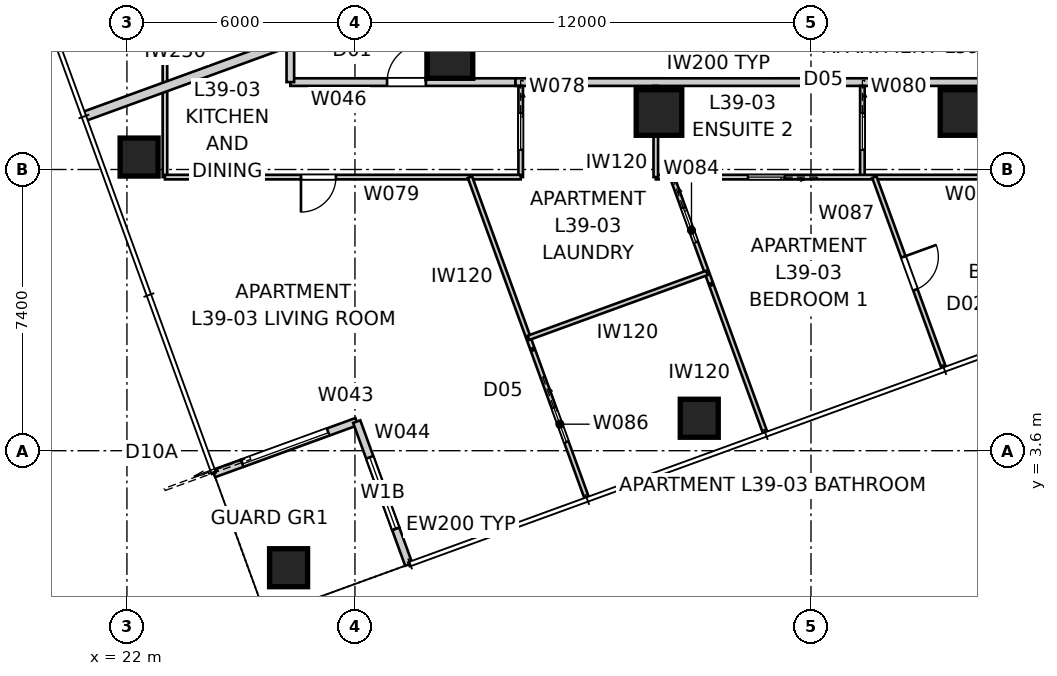
"""IFC4 building model, lengths in metres.
Left out: names, types, materials, properties, quantities, classifications, styles, units other than length and angle.
Written with IfcOpenShell. Run it as: python <this file> out.ifc"""

import sys

from ifc_helpers import new_model, si_unit, direction, frame, frame_2d, origin, origin_2d, place, context, subcontext, project, spatial, rectangle, extrude, element, fill, save


model = new_model("IFC4")
c1 = context("Model", 3, precision=1e-05, world=origin(), true_north=direction((0.0, 1.0)))
c2 = subcontext(c1, "Body", "Model", "MODEL_VIEW")
j1 = project(units=[si_unit("LENGTHUNIT", "METRE"), si_unit("PLANEANGLEUNIT", "RADIAN")], contexts=[c1])
p1 = place(None, origin())
s1 = spatial("IfcSite", under=j1, at=p1, CompositionType="ELEMENT")
p2 = place(p1, origin())
s2 = spatial("IfcBuilding", under=s1, at=p2, CompositionType="ELEMENT")
p3 = place(p2, frame((0.0, 0.0, 143.8)))
s3 = spatial("IfcBuildingStorey", under=s2, at=p3, CompositionType="ELEMENT", Elevation=143.8)
for number, where, z_axis, x_axis in (
    (1, (26.253, 0.521, -0.15), (0.0, 0.0, 1.0), (1.0, 0.0, 0.0)),
    (2, (37.06, 4.454, -0.15), (0.0, 0.0, 1.0), (1.0, 0.0, 0.0)),
    (3, (22.32, 11.327, -0.15), (0.0, 0.0, 1.0), (1.0, 0.0, 0.0)),
):
    element("IfcColumn", number, at=place(p3, frame(where, z_axis=z_axis, x_axis=x_axis)), inside=s3, PredefinedType="COLUMN", context=c2, shape_type="SweptSolid", body=[
        extrude(rectangle(XDim=1.0, YDim=1.0, at=origin_2d()), origin(), (0.0, 0.0, 1.0), 3.55),
    ])
for number, where, z_axis, x_axis in (
    (4, (30.5, 14.0, 0.0), (0.0, 0.0, 1.0), (1.0, 0.0, 0.0)),
    (5, (36.0, 12.5, 0.0), (0.0, 0.0, 1.0), (1.0, 0.0, 0.0)),
    (6, (44.0, 12.5, 0.0), (0.0, 0.0, 1.0), (1.0, 0.0, 0.0)),
):
    element("IfcColumn", number, at=place(p3, frame(where, z_axis=z_axis, x_axis=x_axis)), inside=s3, PredefinedType="COLUMN", context=c2, shape_type="SweptSolid", body=[
        extrude(rectangle(XDim=1.2, YDim=1.2, at=origin_2d()), origin(), (0.0, 0.0, 1.0), 3.4),
    ])
p4 = place(p3, frame((24.288, 2.998, 0.0), z_axis=(0.0, 0.0, 1.0), x_axis=(0.939659694648, 0.342110593602, 0.0)))
e7 = element("IfcWall", 7, at=p4, inside=s3, PredefinedType="SOLIDWALL", context=c2, shape_type="SweptSolid", body=[
    extrude(rectangle(XDim=0.8, YDim=0.2, at=frame_2d((0.4, 0.0))), origin(), (0.0, 0.0, 1.0), 3.25),
])
p5 = place(p3, frame((25.04, 3.271, 0.0), z_axis=(0.0, 0.0, 1.0), x_axis=(0.939693144909, 0.342018703306, 0.0)))
e8 = element("IfcWall", 8, at=p5, inside=s3, PredefinedType="SOLIDWALL", context=c2, shape_type="SweptSolid", body=[
    extrude(rectangle(XDim=3.2, YDim=0.2, at=frame_2d((1.6, 0.0))), origin(), (0.0, 0.0, 1.0), 2.722),
])
p6 = place(p5, origin())
e9 = element("IfcOpeningElement", 9, at=p6, cuts=e8, PredefinedType="OPENING", context=c2, shape_type="SweptSolid", body=[
    extrude(rectangle(XDim=2.4, YDim=2.1, at=frame_2d((1.2, 1.05))), frame((0.0, 0.11, 0.0), z_axis=(0.0, -1.0, 0.0), x_axis=(1.0, 0.0, 0.0)), (0.0, 0.0, 1.0), 0.22),
])
p7 = place(p3, frame((28.047, 4.366, 0.0), z_axis=(0.0, 0.0, 1.0), x_axis=(0.341965219194, -0.939712609717, 0.0)))
e10 = element("IfcWall", 10, at=p7, inside=s3, PredefinedType="SOLIDWALL", context=c2, shape_type="SweptSolid", body=[
    extrude(rectangle(XDim=3.0, YDim=0.2, at=frame_2d((1.5, 0.0))), origin(), (0.0, 0.0, 1.0), 2.722),
])
p8 = place(p7, frame((1.0, 0.0, 0.45)))
e11 = element("IfcOpeningElement", 11, at=p8, cuts=e10, PredefinedType="OPENING", context=c2, shape_type="SweptSolid", body=[
    extrude(rectangle(XDim=2.0, YDim=1.8, at=frame_2d((1.0, 0.9))), frame((0.0, 0.11, 0.0), z_axis=(0.0, -1.0, 0.0), x_axis=(1.0, 0.0, 0.0)), (0.0, 0.0, 1.0), 0.22),
])
p9 = place(p3, frame((29.073, 1.547, 0.0), z_axis=(0.0, 0.0, 1.0), x_axis=(0.342037080957, -0.939686455819, 0.0)))
e12 = element("IfcWall", 12, at=p9, inside=s3, PredefinedType="SOLIDWALL", context=c2, shape_type="SweptSolid", body=[
    extrude(rectangle(XDim=1.0, YDim=0.2, at=frame_2d((0.5, 0.0))), origin(), (0.0, 0.0, 1.0), 3.25),
])
p10 = place(p3, frame((26.3, 13.3, 0.0), z_axis=(0.0, 0.0, 1.0), x_axis=(1.0, 0.0, 0.0)))
e13 = element("IfcWall", 13, at=p10, inside=s3, PredefinedType="PARTITIONING", context=c2, shape_type="SweptSolid", body=[
    extrude(rectangle(XDim=5.925, YDim=0.2, at=frame_2d((2.962, 0.0))), origin(), (0.0, 0.0, 1.0), 3.25),
])
p11 = place(p10, frame((2.545, 0.0, 0.0)))
e14 = element("IfcOpeningElement", 14, at=p11, cuts=e13, PredefinedType="OPENING", context=c2, shape_type="SweptSolid", body=[
    extrude(rectangle(XDim=1.02, YDim=2.34, at=frame_2d((0.51, 1.17))), frame((0.0, 0.11, 0.0), z_axis=(0.0, -1.0, 0.0), x_axis=(1.0, 0.0, 0.0)), (0.0, 0.0, 1.0), 0.22),
])
p12 = place(p3, frame((32.225, 13.3, 0.0), z_axis=(0.0, 0.0, 1.0), x_axis=(1.0, 0.0, 0.0)))
e15 = element("IfcWall", 15, at=p12, inside=s3, PredefinedType="PARTITIONING", context=c2, shape_type="SweptSolid", body=[
    extrude(rectangle(XDim=1.684, YDim=0.2, at=frame_2d((0.842, 0.0))), origin(), (0.0, 0.0, 1.0), 2.55),
])
p13 = place(p3, frame((33.908, 13.3, 0.0), z_axis=(0.0, 0.0, 1.0), x_axis=(1.0, 0.0, 0.0)))
e16 = element("IfcWall", 16, at=p13, inside=s3, PredefinedType="PARTITIONING", context=c2, shape_type="SweptSolid", body=[
    extrude(rectangle(XDim=12.183, YDim=0.2, at=frame_2d((6.092, 0.0))), origin(), (0.0, 0.0, 1.0), 3.25),
])
p14 = place(p3, frame((26.3, 46.3, 0.0), z_axis=(0.0, 0.0, 1.0), x_axis=(0.0, -1.0, 0.0)))
e17 = element("IfcWall", 17, at=p14, inside=s3, PredefinedType="PARTITIONING", context=c2, shape_type="SweptSolid", body=[
    extrude(rectangle(XDim=33.0, YDim=0.2, at=frame_2d((16.5, 0.0))), origin(), (0.0, 0.0, 1.0), 3.25),
])
p15 = place(p14, frame((13.229, 0.0, 0.0)))
e18 = element("IfcOpeningElement", 18, at=p15, cuts=e17, PredefinedType="OPENING", context=c2, shape_type="SweptSolid", body=[
    extrude(rectangle(XDim=1.02, YDim=2.34, at=frame_2d((0.51, 1.17))), frame((0.0, 0.11, 0.0), z_axis=(0.0, -1.0, 0.0), x_axis=(1.0, 0.0, 0.0)), (0.0, 0.0, 1.0), 0.22),
])
p16 = place(p14, frame((28.51, 0.0, 0.0)))
e19 = element("IfcOpeningElement", 19, at=p16, cuts=e17, PredefinedType="OPENING", context=c2, shape_type="SweptSolid", body=[
    extrude(rectangle(XDim=1.02, YDim=2.34, at=frame_2d((0.51, 1.17))), frame((0.0, 0.11, 0.0), z_axis=(0.0, -1.0, 0.0), x_axis=(1.0, 0.0, 0.0)), (0.0, 0.0, 1.0), 0.22),
])
p17 = place(p14, frame((1.998, 0.0, 0.0)))
e20 = element("IfcOpeningElement", 20, at=p17, cuts=e17, PredefinedType="OPENING", context=c2, shape_type="SweptSolid", body=[
    extrude(rectangle(XDim=1.02, YDim=2.34, at=frame_2d((0.51, 1.17))), frame((0.0, 0.11, 0.0), z_axis=(0.0, -1.0, 0.0), x_axis=(1.0, 0.0, 0.0)), (0.0, 0.0, 1.0), 0.22),
])
p18 = place(p3, frame((20.868, 12.395, 0.0), z_axis=(0.0, 0.0, 1.0), x_axis=(0.939690274876, 0.342026588591, 0.0)))
e21 = element("IfcWall", 21, at=p18, inside=s3, PredefinedType="PARTITIONING", context=c2, shape_type="SweptSolid", body=[
    extrude(rectangle(XDim=5.669, YDim=0.25, at=frame_2d((2.834, 0.0))), origin(), (0.0, 0.0, 1.0), 3.25),
])
p19 = place(p3, frame((23.0, 10.8, 0.0), z_axis=(0.0, 0.0, 1.0), x_axis=(0.0, 1.0, 0.0)))
e22 = element("IfcWall", 22, at=p19, inside=s3, PredefinedType="PARTITIONING", context=c2, shape_type="SweptSolid", body=[
    extrude(rectangle(XDim=38.0, YDim=0.12, at=frame_2d((19.0, 0.0))), origin(), (0.0, 0.0, 1.0), 2.55),
])
p20 = place(p19, frame((20.674, 0.0, 0.0)))
e23 = element("IfcOpeningElement", 23, at=p20, cuts=e22, PredefinedType="OPENING", context=c2, shape_type="SweptSolid", body=[
    extrude(rectangle(XDim=0.92, YDim=2.34, at=frame_2d((0.46, 1.17))), frame((0.0, 0.07, 0.0), z_axis=(0.0, -1.0, 0.0), x_axis=(1.0, 0.0, 0.0)), (0.0, 0.0, 1.0), 0.14),
])
p21 = place(p19, frame((4.598, 0.0, 0.0)))
e24 = element("IfcOpeningElement", 24, at=p21, cuts=e22, PredefinedType="OPENING", context=c2, shape_type="SweptSolid", body=[
    extrude(rectangle(XDim=0.92, YDim=2.34, at=frame_2d((0.46, 1.17))), frame((0.0, 0.07, 0.0), z_axis=(0.0, -1.0, 0.0), x_axis=(1.0, 0.0, 0.0)), (0.0, 0.0, 1.0), 0.14),
])
p22 = place(p19, frame((8.043, 0.0, 0.0)))
e25 = element("IfcOpeningElement", 25, at=p22, cuts=e22, PredefinedType="OPENING", context=c2, shape_type="SweptSolid", body=[
    extrude(rectangle(XDim=0.92, YDim=2.34, at=frame_2d((0.46, 1.17))), frame((0.0, 0.07, 0.0), z_axis=(0.0, -1.0, 0.0), x_axis=(1.0, 0.0, 0.0)), (0.0, 0.0, 1.0), 0.14),
])
p23 = place(p19, frame((33.957, 0.0, 0.0)))
e26 = element("IfcOpeningElement", 26, at=p23, cuts=e22, PredefinedType="OPENING", context=c2, shape_type="SweptSolid", body=[
    extrude(rectangle(XDim=0.92, YDim=2.34, at=frame_2d((0.46, 1.17))), frame((0.0, 0.07, 0.0), z_axis=(0.0, -1.0, 0.0), x_axis=(1.0, 0.0, 0.0)), (0.0, 0.0, 1.0), 0.14),
])
p24 = place(p19, frame((26.957, 0.0, 0.0)))
e27 = element("IfcOpeningElement", 27, at=p24, cuts=e22, PredefinedType="OPENING", context=c2, shape_type="SweptSolid", body=[
    extrude(rectangle(XDim=0.96, YDim=2.1, at=frame_2d((0.48, 1.05))), frame((0.0, 0.07, 0.0), z_axis=(0.0, -1.0, 0.0), x_axis=(1.0, 0.0, 0.0)), (0.0, 0.0, 1.0), 0.14),
])
p25 = place(p3, frame((32.361, 13.2, 0.0), z_axis=(0.0, 0.0, 1.0), x_axis=(0.0, -1.0, 0.0)))
e28 = element("IfcWall", 28, at=p25, inside=s3, PredefinedType="PARTITIONING", context=c2, shape_type="SweptSolid", body=[
    extrude(rectangle(XDim=2.4, YDim=0.12, at=frame_2d((1.2, 0.0))), origin(), (0.0, 0.0, 1.0), 3.25),
])
p26 = place(p25, frame((0.72, 0.0, 0.0)))
e29 = element("IfcOpeningElement", 29, at=p26, cuts=e28, PredefinedType="OPENING", context=c2, shape_type="SweptSolid", body=[
    extrude(rectangle(XDim=0.96, YDim=2.1, at=frame_2d((0.48, 1.05))), frame((0.0, 0.07, 0.0), z_axis=(0.0, -1.0, 0.0), x_axis=(1.0, 0.0, 0.0)), (0.0, 0.0, 1.0), 0.14),
])
p27 = place(p3, frame((32.361, 10.8, 0.0), z_axis=(0.0, 0.0, 1.0), x_axis=(-1.0, 0.0, 0.0)))
e30 = element("IfcWall", 30, at=p27, inside=s3, PredefinedType="PARTITIONING", context=c2, shape_type="SweptSolid", body=[
    extrude(rectangle(XDim=9.361, YDim=0.12, at=frame_2d((4.681, 0.0))), origin(), (0.0, 0.0, 1.0), 3.25),
])
p28 = place(p27, frame((4.862, 0.0, 0.0)))
e31 = element("IfcOpeningElement", 31, at=p28, cuts=e30, PredefinedType="OPENING", context=c2, shape_type="SweptSolid", body=[
    extrude(rectangle(XDim=0.92, YDim=2.34, at=frame_2d((0.46, 1.17))), frame((0.0, 0.07, 0.0), z_axis=(0.0, -1.0, 0.0), x_axis=(1.0, 0.0, 0.0)), (0.0, 0.0, 1.0), 0.14),
])
p29 = place(p3, frame((41.353, 13.2, 0.0), z_axis=(0.0, 0.0, 1.0), x_axis=(0.0, -1.0, 0.0)))
e32 = element("IfcWall", 32, at=p29, inside=s3, PredefinedType="PARTITIONING", context=c2, shape_type="SweptSolid", body=[
    extrude(rectangle(XDim=2.4, YDim=0.12, at=frame_2d((1.2, 0.0))), origin(), (0.0, 0.0, 1.0), 3.25),
])
p30 = place(p29, frame((0.72, 0.0, 0.0)))
e33 = element("IfcOpeningElement", 33, at=p30, cuts=e32, PredefinedType="OPENING", context=c2, shape_type="SweptSolid", body=[
    extrude(rectangle(XDim=0.96, YDim=2.1, at=frame_2d((0.48, 1.05))), frame((0.0, 0.07, 0.0), z_axis=(0.0, -1.0, 0.0), x_axis=(1.0, 0.0, 0.0)), (0.0, 0.0, 1.0), 0.14),
])
p31 = place(p3, frame((53.8, 10.8, 0.0), z_axis=(0.0, 0.0, 1.0), x_axis=(-1.0, 0.0, 0.0)))
e34 = element("IfcWall", 34, at=p31, inside=s3, PredefinedType="PARTITIONING", context=c2, shape_type="SweptSolid", body=[
    extrude(rectangle(XDim=17.884, YDim=0.12, at=frame_2d((8.942, 0.0))), origin(), (0.0, 0.0, 1.0), 3.25),
])
p32 = place(p31, frame((3.665, 0.0, 0.0)))
e35 = element("IfcOpeningElement", 35, at=p32, cuts=e34, PredefinedType="OPENING", context=c2, shape_type="SweptSolid", body=[
    extrude(rectangle(XDim=0.92, YDim=2.34, at=frame_2d((0.46, 1.17))), frame((0.0, 0.07, 0.0), z_axis=(0.0, -1.0, 0.0), x_axis=(1.0, 0.0, 0.0)), (0.0, 0.0, 1.0), 0.14),
])
p33 = place(p31, frame((14.497, 0.0, 0.0)))
e36 = element("IfcOpeningElement", 36, at=p33, cuts=e34, PredefinedType="OPENING", context=c2, shape_type="SweptSolid", body=[
    extrude(rectangle(XDim=0.96, YDim=2.1, at=frame_2d((0.48, 1.05))), frame((0.0, 0.07, 0.0), z_axis=(0.0, -1.0, 0.0), x_axis=(1.0, 0.0, 0.0)), (0.0, 0.0, 1.0), 0.14),
])
p34 = place(p3, frame((35.916, 10.8, 0.0), z_axis=(0.0, 0.0, 1.0), x_axis=(0.0, 1.0, 0.0)))
e37 = element("IfcWall", 37, at=p34, inside=s3, PredefinedType="PARTITIONING", context=c2, shape_type="SweptSolid", body=[
    extrude(rectangle(XDim=2.4, YDim=0.12, at=frame_2d((1.2, 0.0))), origin(), (0.0, 0.0, 1.0), 3.25),
])
p35 = place(p3, frame((32.666, 6.292, 0.0), z_axis=(0.0, 0.0, 1.0), x_axis=(-0.341988220281, 0.93970423921, 0.0)))
e38 = element("IfcWall", 38, at=p35, inside=s3, PredefinedType="PARTITIONING", context=c2, shape_type="SweptSolid", body=[
    extrude(rectangle(XDim=4.797, YDim=0.12, at=frame_2d((2.399, 0.0))), origin(), (0.0, 0.0, 1.0), 3.25),
])
p36 = place(p3, frame((36.346, 10.8, 0.0), z_axis=(0.0, 0.0, 1.0), x_axis=(0.341986632257, -0.939704817141, 0.0)))
e39 = element("IfcWall", 39, at=p36, inside=s3, PredefinedType="PARTITIONING", context=c2, shape_type="SweptSolid", body=[
    extrude(rectangle(XDim=2.978, YDim=0.12, at=frame_2d((1.489, 0.0))), origin(), (0.0, 0.0, 1.0), 3.25),
])
p37 = place(p36, frame((0.861, 0.0, 0.0)))
e40 = element("IfcOpeningElement", 40, at=p37, cuts=e39, PredefinedType="OPENING", context=c2, shape_type="SweptSolid", body=[
    extrude(rectangle(XDim=0.96, YDim=2.1, at=frame_2d((0.48, 1.05))), frame((0.0, 0.07, 0.0), z_axis=(0.0, -1.0, 0.0), x_axis=(1.0, 0.0, 0.0)), (0.0, 0.0, 1.0), 0.14),
])
p38 = place(p3, frame((37.264, 8.28, 0.0), z_axis=(0.0, 0.0, 1.0), x_axis=(-0.939686455819, -0.342037080957, 0.0)))
e41 = element("IfcWall", 41, at=p38, inside=s3, PredefinedType="PARTITIONING", context=c2, shape_type="SweptSolid", body=[
    extrude(rectangle(XDim=5.0, YDim=0.12, at=frame_2d((2.5, 0.0))), origin(), (0.0, 0.0, 1.0), 3.25),
])
p39 = place(p3, frame((32.685, 6.241, 0.0), z_axis=(0.0, 0.0, 1.0), x_axis=(0.342036918442, -0.939686514973, 0.0)))
e42 = element("IfcWall", 42, at=p39, inside=s3, PredefinedType="PARTITIONING", context=c2, shape_type="SweptSolid", body=[
    extrude(rectangle(XDim=4.136, YDim=0.12, at=frame_2d((2.068, 0.0))), origin(), (0.0, 0.0, 1.0), 3.25),
])
p40 = place(p39, frame((1.608, 0.0, 0.0)))
e43 = element("IfcOpeningElement", 43, at=p40, cuts=e42, PredefinedType="OPENING", context=c2, shape_type="SweptSolid", body=[
    extrude(rectangle(XDim=0.96, YDim=2.1, at=frame_2d((0.48, 1.05))), frame((0.0, 0.07, 0.0), z_axis=(0.0, -1.0, 0.0), x_axis=(1.0, 0.0, 0.0)), (0.0, 0.0, 1.0), 0.14),
])
p41 = place(p3, frame((41.667, 10.8, 0.0), z_axis=(0.0, 0.0, 1.0), x_axis=(0.341995981916, -0.939701414468, 0.0)))
e44 = element("IfcWall", 44, at=p41, inside=s3, PredefinedType="PARTITIONING", context=c2, shape_type="SweptSolid", body=[
    extrude(rectangle(XDim=5.348, YDim=0.12, at=frame_2d((2.674, 0.0))), origin(), (0.0, 0.0, 1.0), 3.25),
])
p42 = place(p41, frame((2.234, 0.0, 0.0)))
e45 = element("IfcOpeningElement", 45, at=p42, cuts=e44, PredefinedType="OPENING", context=c2, shape_type="SweptSolid", body=[
    extrude(rectangle(XDim=0.92, YDim=2.34, at=frame_2d((0.46, 1.17))), frame((0.0, 0.07, 0.0), z_axis=(0.0, -1.0, 0.0), x_axis=(1.0, 0.0, 0.0)), (0.0, 0.0, 1.0), 0.14),
])
p43 = place(p3, frame((38.798, 4.065, 0.0), z_axis=(0.0, 0.0, 1.0), x_axis=(-0.342036918442, 0.939686514973, 0.0)))
e46 = element("IfcWall", 46, at=p43, inside=s3, PredefinedType="PARTITIONING", context=c2, shape_type="SweptSolid", body=[
    extrude(rectangle(XDim=4.136, YDim=0.12, at=frame_2d((2.068, 0.0))), origin(), (0.0, 0.0, 1.0), 3.25),
])
p44 = place(p6, origin())
e47 = element("IfcDoor", 47, at=p44, inside=s3, OperationType="SLIDING_TO_LEFT", PredefinedType="DOOR", context=c2, shape_type="SweptSolid", body=[
    extrude(rectangle(XDim=2.4, YDim=2.1, at=frame_2d((1.2, 1.05))), frame((0.0, 0.025, 0.0), z_axis=(0.0, -1.0, 0.0), x_axis=(1.0, 0.0, 0.0)), (0.0, 0.0, 1.0), 0.05),
])
fill(e9, e47)
p45 = place(p8, origin())
e48 = element("IfcWindow", 48, at=p45, inside=s3, PartitioningType="SINGLE_PANEL", PredefinedType="WINDOW", context=c2, shape_type="SweptSolid", body=[
    extrude(rectangle(XDim=2.0, YDim=1.8, at=frame_2d((1.0, 0.9))), frame((0.0, 0.03, 0.0), z_axis=(0.0, -1.0, 0.0), x_axis=(1.0, 0.0, 0.0)), (0.0, 0.0, 1.0), 0.06),
])
fill(e11, e48)
p46 = place(p11, origin())
e49 = element("IfcDoor", 49, at=p46, inside=s3, OperationType="SINGLE_SWING_RIGHT", PredefinedType="DOOR", context=c2, shape_type="SweptSolid", body=[
    extrude(rectangle(XDim=1.02, YDim=2.34, at=frame_2d((0.51, 1.17))), frame((0.0, 0.025, 0.0), z_axis=(0.0, -1.0, 0.0), x_axis=(1.0, 0.0, 0.0)), (0.0, 0.0, 1.0), 0.05),
])
fill(e14, e49)
p47 = place(p28, origin())
e50 = element("IfcDoor", 50, at=p47, inside=s3, OperationType="SINGLE_SWING_RIGHT", PredefinedType="DOOR", context=c2, shape_type="SweptSolid", body=[
    extrude(rectangle(XDim=0.92, YDim=2.34, at=frame_2d((0.46, 1.17))), frame((0.0, 0.025, 0.0), z_axis=(0.0, -1.0, 0.0), x_axis=(1.0, 0.0, 0.0)), (0.0, 0.0, 1.0), 0.05),
])
fill(e31, e50)
p48 = place(p26, origin())
e51 = element("IfcDoor", 51, at=p48, inside=s3, OperationType="SLIDING_TO_LEFT", PredefinedType="DOOR", context=c2, shape_type="SweptSolid", body=[
    extrude(rectangle(XDim=0.96, YDim=2.1, at=frame_2d((0.48, 1.05))), frame((0.0, 0.025, 0.0), z_axis=(0.0, -1.0, 0.0), x_axis=(1.0, 0.0, 0.0)), (0.0, 0.0, 1.0), 0.05),
])
fill(e29, e51)
p49 = place(p40, origin())
e52 = element("IfcDoor", 52, at=p49, inside=s3, OperationType="SLIDING_TO_LEFT", PredefinedType="DOOR", context=c2, shape_type="SweptSolid", body=[
    extrude(rectangle(XDim=0.96, YDim=2.1, at=frame_2d((0.48, 1.05))), frame((0.0, 0.025, 0.0), z_axis=(0.0, -1.0, 0.0), x_axis=(1.0, 0.0, 0.0)), (0.0, 0.0, 1.0), 0.05),
])
fill(e43, e52)
p50 = place(p37, origin())
e53 = element("IfcDoor", 53, at=p50, inside=s3, OperationType="SLIDING_TO_LEFT", PredefinedType="DOOR", context=c2, shape_type="SweptSolid", body=[
    extrude(rectangle(XDim=0.96, YDim=2.1, at=frame_2d((0.48, 1.05))), frame((0.0, 0.025, 0.0), z_axis=(0.0, -1.0, 0.0), x_axis=(1.0, 0.0, 0.0)), (0.0, 0.0, 1.0), 0.05),
])
fill(e40, e53)
p51 = place(p42, origin())
e54 = element("IfcDoor", 54, at=p51, inside=s3, OperationType="SINGLE_SWING_LEFT", PredefinedType="DOOR", context=c2, shape_type="SweptSolid", body=[
    extrude(rectangle(XDim=0.92, YDim=2.34, at=frame_2d((0.46, 1.17))), frame((0.0, 0.025, 0.0), z_axis=(0.0, -1.0, 0.0), x_axis=(1.0, 0.0, 0.0)), (0.0, 0.0, 1.0), 0.05),
])
fill(e45, e54)
p52 = place(p33, origin())
e55 = element("IfcDoor", 55, at=p52, inside=s3, OperationType="SLIDING_TO_LEFT", PredefinedType="DOOR", context=c2, shape_type="SweptSolid", body=[
    extrude(rectangle(XDim=0.96, YDim=2.1, at=frame_2d((0.48, 1.05))), frame((0.0, 0.025, 0.0), z_axis=(0.0, -1.0, 0.0), x_axis=(1.0, 0.0, 0.0)), (0.0, 0.0, 1.0), 0.05),
])
fill(e36, e55)
p53 = place(p30, origin())
e56 = element("IfcDoor", 56, at=p53, inside=s3, OperationType="SLIDING_TO_LEFT", PredefinedType="DOOR", context=c2, shape_type="SweptSolid", body=[
    extrude(rectangle(XDim=0.96, YDim=2.1, at=frame_2d((0.48, 1.05))), frame((0.0, 0.025, 0.0), z_axis=(0.0, -1.0, 0.0), x_axis=(1.0, 0.0, 0.0)), (0.0, 0.0, 1.0), 0.05),
])
fill(e33, e56)
save(model, sys.argv[1])
